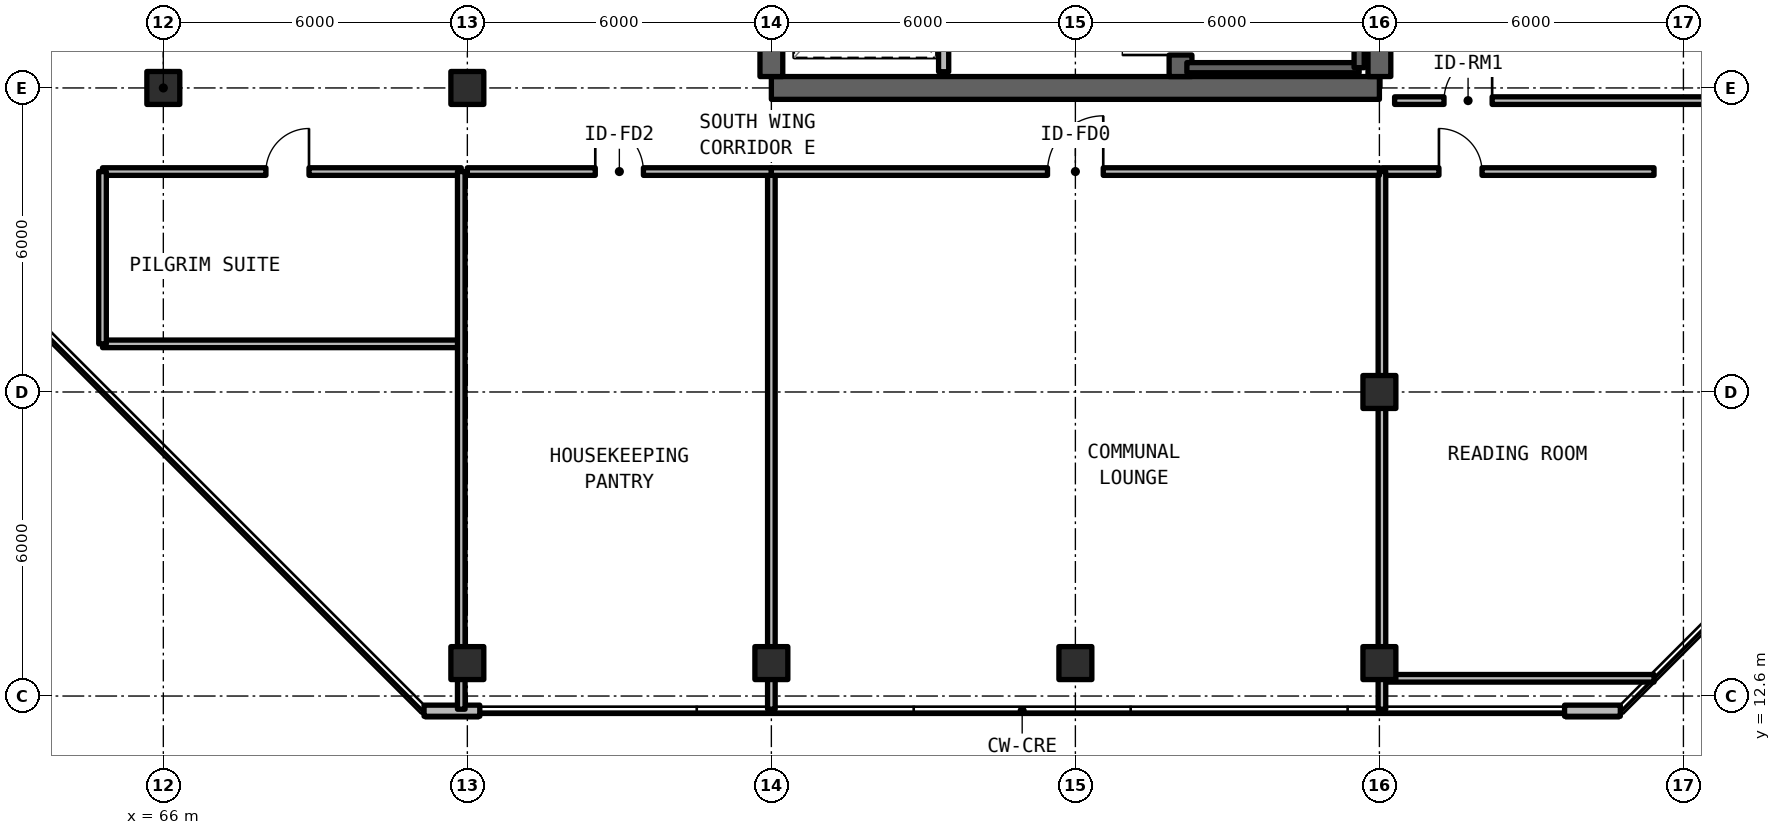
"""IFC4 building model, lengths in metres.
Left out: names, types, materials, properties, quantities, classifications, styles, units other than length and angle.
Written with IfcOpenShell. Run it as: python <this file> out.ifc"""

import sys

from ifc_helpers import new_model, si_unit, direction, frame, frame_2d, origin, origin_2d, place, context, subcontext, project, spatial, rectangle, extrude, element, fill, save


model = new_model("IFC4")
c1 = context("Model", 3, precision=1e-05, world=origin(), true_north=direction((0.0, 1.0)))
c2 = subcontext(c1, "Body", "Model", "MODEL_VIEW")
j1 = project(units=[si_unit("LENGTHUNIT", "METRE"), si_unit("PLANEANGLEUNIT", "RADIAN")], contexts=[c1])
p1 = place(None, origin())
s1 = spatial("IfcSite", under=j1, at=p1, CompositionType="ELEMENT")
p2 = place(p1, origin())
s2 = spatial("IfcBuilding", under=s1, at=p2, CompositionType="ELEMENT")
p3 = place(p2, frame((0.0, 0.0, 253.44)))
s3 = spatial("IfcBuildingStorey", under=s2, at=p3, CompositionType="ELEMENT", Elevation=253.44)
p4 = place(p3, frame((78.0, 24.6, 0.0), z_axis=(0.0, 0.0, 1.0), x_axis=(1.0, 0.0, 0.0)))
e1 = element("IfcWall", 1, at=p4, inside=s3, PredefinedType="SHEAR", context=c2, shape_type="SweptSolid", body=[
    extrude(rectangle(XDim=12.0, YDim=0.45, at=frame_2d((6.0, 0.0))), origin(), (0.0, 0.0, 1.0), 3.63),
])
p5 = place(p3, frame((90.0, 24.825, 0.0), z_axis=(0.0, 0.0, 1.0), x_axis=(0.0, 1.0, 0.0)))
e2 = element("IfcWall", 2, at=p5, inside=s3, PredefinedType="SHEAR", context=c2, shape_type="SweptSolid", body=[
    extrude(rectangle(XDim=17.55, YDim=0.45, at=frame_2d((8.775, 0.0))), origin(), (0.0, 0.0, 1.0), 3.63),
])
p6 = place(p3, frame((78.0, 24.825, 0.0), z_axis=(0.0, 0.0, 1.0), x_axis=(0.0, 1.0, 0.0)))
e3 = element("IfcWall", 3, at=p6, inside=s3, PredefinedType="SHEAR", context=c2, shape_type="SweptSolid", body=[
    extrude(rectangle(XDim=8.975, YDim=0.45, at=frame_2d((4.488, 0.0))), origin(), (0.0, 0.0, 1.0), 3.63),
])
p7 = place(p3, frame((86.075, 24.825, 0.0), z_axis=(0.0, 0.0, 1.0), x_axis=(0.0, 1.0, 0.0)))
e4 = element("IfcWall", 4, at=p7, inside=s3, PredefinedType="SHEAR", context=c2, shape_type="SweptSolid", body=[
    extrude(rectangle(XDim=17.55, YDim=0.45, at=frame_2d((8.775, 0.0))), origin(), (0.0, 0.0, 1.0), 3.63),
])
p8 = place(p7, frame((0.425, 0.0, 0.0)))
e5 = element("IfcOpeningElement", 5, at=p8, cuts=e4, PredefinedType="OPENING", context=c2, shape_type="SweptSolid", body=[
    extrude(rectangle(XDim=1.15, YDim=2.15, at=frame_2d((0.575, 1.075))), frame((0.0, 0.235, 0.0), z_axis=(0.0, -1.0, 0.0), x_axis=(1.0, 0.0, 0.0)), (0.0, 0.0, 1.0), 0.47),
])
p9 = place(p7, frame((9.625, 0.0, 0.0)))
e6 = element("IfcOpeningElement", 6, at=p9, cuts=e4, PredefinedType="OPENING", context=c2, shape_type="SweptSolid", body=[
    extrude(rectangle(XDim=1.15, YDim=2.15, at=frame_2d((0.575, 1.075))), frame((0.0, 0.235, 0.0), z_axis=(0.0, -1.0, 0.0), x_axis=(1.0, 0.0, 0.0)), (0.0, 0.0, 1.0), 0.47),
])
for number, where, z_axis, x_axis in (
    (7, (66.0, 24.6, 0.0), (0.0, 0.0, 1.0), (1.0, 0.0, 0.0)),
    (8, (72.0, 24.6, 0.0), (0.0, 0.0, 1.0), (1.0, 0.0, 0.0)),
    (9, (90.0, 18.6, 0.0), (0.0, 0.0, 1.0), (1.0, 0.0, 0.0)),
    (10, (72.0, 13.25, 0.0), (0.0, 0.0, 1.0), (1.0, 0.0, 0.0)),
    (11, (78.0, 13.25, 0.0), (0.0, 0.0, 1.0), (1.0, 0.0, 0.0)),
    (12, (84.0, 13.25, 0.0), (0.0, 0.0, 1.0), (1.0, 0.0, 0.0)),
    (13, (90.0, 13.25, 0.0), (0.0, 0.0, 1.0), (1.0, 0.0, 0.0)),
):
    element("IfcColumn", number, at=place(p3, frame(where, z_axis=z_axis, x_axis=x_axis)), inside=s3, PredefinedType="COLUMN", context=c2, shape_type="SweptSolid", body=[
        extrude(rectangle(XDim=0.65, YDim=0.65, at=origin_2d()), origin(), (0.0, 0.0, 1.0), 3.63),
    ])
for number, where, z_axis, x_axis in (
    (14, (71.146, 12.31, 0.0), (0.0, 0.0, 1.0), (1.0, 0.0, 0.0)),
    (15, (93.654, 12.31, 0.0), (0.0, 0.0, 1.0), (1.0, 0.0, 0.0)),
):
    element("IfcWall", number, at=place(p3, frame(where, z_axis=z_axis, x_axis=x_axis)), inside=s3, PredefinedType="SOLIDWALL", context=c2, shape_type="SweptSolid", body=[
        extrude(rectangle(XDim=1.1, YDim=0.22, at=frame_2d((0.55, 0.0))), origin(), (0.0, 0.0, 1.0), 3.41),
    ])
p10 = place(p3, frame((81.4, 24.92, 0.0), z_axis=(0.0, 0.0, 1.0), x_axis=(0.0, 1.0, 0.0)))
e16 = element("IfcWall", 16, at=p10, inside=s3, PredefinedType="SOLIDWALL", context=c2, shape_type="SweptSolid", body=[
    extrude(rectangle(XDim=3.58, YDim=0.2, at=frame_2d((1.79, 0.0))), origin(), (0.0, 0.0, 1.0), 2.63),
])
p11 = place(p10, frame((1.3, 0.0, 0.0)))
e17 = element("IfcOpeningElement", 17, at=p11, cuts=e16, PredefinedType="OPENING", context=c2, shape_type="SweptSolid", body=[
    extrude(rectangle(XDim=1.1, YDim=2.2, at=frame_2d((0.55, 1.1))), frame((0.0, 0.11, 0.0), z_axis=(0.0, -1.0, 0.0), x_axis=(1.0, 0.0, 0.0)), (0.0, 0.0, 1.0), 0.22),
])
p12 = place(p3, frame((64.8, 19.55, 0.0), z_axis=(0.0, 0.0, 1.0), x_axis=(1.0, 0.0, 0.0)))
e18 = element("IfcWall", 18, at=p12, inside=s3, PredefinedType="SOLIDWALL", context=c2, shape_type="SweptSolid", body=[
    extrude(rectangle(XDim=7.08, YDim=0.15, at=frame_2d((3.54, 0.0))), origin(), (0.0, 0.0, 1.0), 2.63),
])
p13 = place(p3, frame((64.8, 22.95, 0.0), z_axis=(0.0, 0.0, 1.0), x_axis=(1.0, 0.0, 0.0)))
e19 = element("IfcWall", 19, at=p13, inside=s3, PredefinedType="SOLIDWALL", context=c2, shape_type="SweptSolid", body=[
    extrude(rectangle(XDim=7.08, YDim=0.15, at=frame_2d((3.54, 0.0))), origin(), (0.0, 0.0, 1.0), 2.63),
])
p14 = place(p13, frame((3.225, 0.0, 0.0)))
e20 = element("IfcOpeningElement", 20, at=p14, cuts=e19, PredefinedType="OPENING", context=c2, shape_type="SweptSolid", body=[
    extrude(rectangle(XDim=0.85, YDim=2.1, at=frame_2d((0.425, 1.05))), frame((0.0, 0.085, 0.0), z_axis=(0.0, -1.0, 0.0), x_axis=(1.0, 0.0, 0.0)), (0.0, 0.0, 1.0), 0.17),
])
p15 = place(p3, frame((64.8, 19.55, 0.0), z_axis=(0.0, 0.0, 1.0), x_axis=(0.0, 1.0, 0.0)))
e21 = element("IfcWall", 21, at=p15, inside=s3, PredefinedType="SOLIDWALL", context=c2, shape_type="SweptSolid", body=[
    extrude(rectangle(XDim=3.4, YDim=0.15, at=frame_2d((1.7, 0.0))), origin(), (0.0, 0.0, 1.0), 2.63),
])
p16 = place(p3, frame((71.88, 12.34, 0.0), z_axis=(0.0, 0.0, 1.0), x_axis=(0.0, 1.0, 0.0)))
e22 = element("IfcWall", 22, at=p16, inside=s3, PredefinedType="SOLIDWALL", context=c2, shape_type="SweptSolid", body=[
    extrude(rectangle(XDim=10.61, YDim=0.15, at=frame_2d((5.305, 0.0))), origin(), (0.0, 0.0, 1.0), 2.63),
])
p17 = place(p3, frame((90.3, 24.35, 0.0), z_axis=(0.0, 0.0, 1.0), x_axis=(1.0, 0.0, 0.0)))
e23 = element("IfcWall", 23, at=p17, inside=s3, PredefinedType="SOLIDWALL", context=c2, shape_type="SweptSolid", body=[
    extrude(rectangle(XDim=8.52, YDim=0.15, at=frame_2d((4.26, 0.0))), origin(), (0.0, 0.0, 1.0), 2.63),
])
p18 = place(p17, frame((0.975, 0.0, 0.0)))
e24 = element("IfcOpeningElement", 24, at=p18, cuts=e23, PredefinedType="OPENING", context=c2, shape_type="SweptSolid", body=[
    extrude(rectangle(XDim=0.95, YDim=2.15, at=frame_2d((0.475, 1.075))), frame((0.0, 0.085, 0.0), z_axis=(0.0, -1.0, 0.0), x_axis=(1.0, 0.0, 0.0)), (0.0, 0.0, 1.0), 0.17),
])
p19 = place(p3, frame((90.05, 12.95, 0.0), z_axis=(0.0, 0.0, 1.0), x_axis=(1.0, 0.0, 0.0)))
e25 = element("IfcWall", 25, at=p19, inside=s3, PredefinedType="SOLIDWALL", context=c2, shape_type="SweptSolid", body=[
    extrude(rectangle(XDim=5.37, YDim=0.15, at=frame_2d((2.685, 0.0))), origin(), (0.0, 0.0, 1.0), 2.63),
])
p20 = place(p3, frame((90.05, 22.95, 0.0), z_axis=(0.0, 0.0, 1.0), x_axis=(1.0, 0.0, 0.0)))
e26 = element("IfcWall", 26, at=p20, inside=s3, PredefinedType="SOLIDWALL", context=c2, shape_type="SweptSolid", body=[
    extrude(rectangle(XDim=5.37, YDim=0.15, at=frame_2d((2.685, 0.0))), origin(), (0.0, 0.0, 1.0), 2.63),
])
p21 = place(p20, frame((1.125, 0.0, 0.0)))
e27 = element("IfcOpeningElement", 27, at=p21, cuts=e26, PredefinedType="OPENING", context=c2, shape_type="SweptSolid", body=[
    extrude(rectangle(XDim=0.85, YDim=2.1, at=frame_2d((0.425, 1.05))), frame((0.0, 0.085, 0.0), z_axis=(0.0, -1.0, 0.0), x_axis=(1.0, 0.0, 0.0)), (0.0, 0.0, 1.0), 0.17),
])
for number, where, z_axis, x_axis in (
    (28, (90.05, 12.34, 0.0), (0.0, 0.0, 1.0), (0.0, 1.0, 0.0)),
    (29, (78.0, 12.34, 0.0), (0.0, 0.0, 1.0), (0.0, 1.0, 0.0)),
):
    element("IfcWall", number, at=place(p3, frame(where, z_axis=z_axis, x_axis=x_axis)), inside=s3, PredefinedType="SOLIDWALL", context=c2, shape_type="SweptSolid", body=[
        extrude(rectangle(XDim=10.61, YDim=0.15, at=frame_2d((5.305, 0.0))), origin(), (0.0, 0.0, 1.0), 2.63),
    ])
p22 = place(p3, frame((72.0, 22.95, 0.0), z_axis=(0.0, 0.0, 1.0), x_axis=(1.0, 0.0, 0.0)))
e30 = element("IfcWall", 30, at=p22, inside=s3, PredefinedType="SOLIDWALL", context=c2, shape_type="SweptSolid", body=[
    extrude(rectangle(XDim=6.0, YDim=0.15, at=frame_2d((3.0, 0.0))), origin(), (0.0, 0.0, 1.0), 2.63),
])
p23 = place(p22, frame((2.525, 0.0, 0.0)))
e31 = element("IfcOpeningElement", 31, at=p23, cuts=e30, PredefinedType="OPENING", context=c2, shape_type="SweptSolid", body=[
    extrude(rectangle(XDim=0.95, YDim=2.15, at=frame_2d((0.475, 1.075))), frame((0.0, 0.085, 0.0), z_axis=(0.0, -1.0, 0.0), x_axis=(1.0, 0.0, 0.0)), (0.0, 0.0, 1.0), 0.17),
])
p24 = place(p3, frame((78.0, 22.95, 0.0), z_axis=(0.0, 0.0, 1.0), x_axis=(1.0, 0.0, 0.0)))
e32 = element("IfcWall", 32, at=p24, inside=s3, PredefinedType="SOLIDWALL", context=c2, shape_type="SweptSolid", body=[
    extrude(rectangle(XDim=12.0, YDim=0.15, at=frame_2d((6.0, 0.0))), origin(), (0.0, 0.0, 1.0), 2.63),
])
p25 = place(p24, frame((5.45, 0.0, 0.0)))
e33 = element("IfcOpeningElement", 33, at=p25, cuts=e32, PredefinedType="OPENING", context=c2, shape_type="SweptSolid", body=[
    extrude(rectangle(XDim=1.1, YDim=2.15, at=frame_2d((0.55, 1.075))), frame((0.0, 0.085, 0.0), z_axis=(0.0, -1.0, 0.0), x_axis=(1.0, 0.0, 0.0)), (0.0, 0.0, 1.0), 0.17),
])
p26 = place(p3, frame((86.2, 25.0, 0.0), z_axis=(0.0, 0.0, 1.0), x_axis=(1.0, 0.0, 0.0)))
e34 = element("IfcWall", 34, at=p26, inside=s3, PredefinedType="SOLIDWALL", context=c2, shape_type="SweptSolid", body=[
    extrude(rectangle(XDim=3.4, YDim=0.2, at=frame_2d((1.7, 0.0))), origin(), (0.0, 0.0, 1.0), 3.63),
])
p27 = place(p3, frame((89.6, 25.0, 0.0), z_axis=(0.0, 0.0, 1.0), x_axis=(0.0, 1.0, 0.0)))
e35 = element("IfcWall", 35, at=p27, inside=s3, PredefinedType="SOLIDWALL", context=c2, shape_type="SweptSolid", body=[
    extrude(rectangle(XDim=8.0, YDim=0.2, at=frame_2d((4.0, 0.0))), origin(), (0.0, 0.0, 1.0), 3.63),
])
p28 = place(p14, origin())
e36 = element("IfcDoor", 36, at=p28, inside=s3, OperationType="SINGLE_SWING_RIGHT", PredefinedType="DOOR", context=c2, shape_type="SweptSolid", body=[
    extrude(rectangle(XDim=0.85, YDim=2.1, at=frame_2d((0.425, 1.05))), frame((0.0, 0.025, 0.0), z_axis=(0.0, -1.0, 0.0), x_axis=(1.0, 0.0, 0.0)), (0.0, 0.0, 1.0), 0.05),
])
fill(e20, e36)
p29 = place(p18, origin())
e37 = element("IfcDoor", 37, at=p29, inside=s3, OperationType="SINGLE_SWING_RIGHT", PredefinedType="DOOR", context=c2, shape_type="SweptSolid", body=[
    extrude(rectangle(XDim=0.95, YDim=2.15, at=frame_2d((0.475, 1.075))), frame((0.0, 0.025, 0.0), z_axis=(0.0, -1.0, 0.0), x_axis=(1.0, 0.0, 0.0)), (0.0, 0.0, 1.0), 0.05),
])
fill(e24, e37)
p30 = place(p21, origin())
e38 = element("IfcDoor", 38, at=p30, inside=s3, OperationType="SINGLE_SWING_LEFT", PredefinedType="DOOR", context=c2, shape_type="SweptSolid", body=[
    extrude(rectangle(XDim=0.85, YDim=2.1, at=frame_2d((0.425, 1.05))), frame((0.0, 0.025, 0.0), z_axis=(0.0, -1.0, 0.0), x_axis=(1.0, 0.0, 0.0)), (0.0, 0.0, 1.0), 0.05),
])
fill(e27, e38)
p31 = place(p23, origin())
e39 = element("IfcDoor", 39, at=p31, inside=s3, OperationType="SINGLE_SWING_LEFT", PredefinedType="DOOR", context=c2, shape_type="SweptSolid", body=[
    extrude(rectangle(XDim=0.95, YDim=2.15, at=frame_2d((0.475, 1.075))), frame((0.0, 0.025, 0.0), z_axis=(0.0, -1.0, 0.0), x_axis=(1.0, 0.0, 0.0)), (0.0, 0.0, 1.0), 0.05),
])
fill(e31, e39)
p32 = place(p25, origin())
e40 = element("IfcDoor", 40, at=p32, inside=s3, OperationType="SINGLE_SWING_RIGHT", PredefinedType="DOOR", context=c2, shape_type="SweptSolid", body=[
    extrude(rectangle(XDim=1.1, YDim=2.15, at=frame_2d((0.55, 1.075))), frame((0.0, 0.025, 0.0), z_axis=(0.0, -1.0, 0.0), x_axis=(1.0, 0.0, 0.0)), (0.0, 0.0, 1.0), 0.05),
])
fill(e33, e40)
p33 = place(p8, origin())
e41 = element("IfcDoor", 41, at=p33, inside=s3, OperationType="SINGLE_SWING_RIGHT", PredefinedType="DOOR", context=c2, shape_type="SweptSolid", body=[
    extrude(rectangle(XDim=1.15, YDim=2.15, at=frame_2d((0.575, 1.075))), frame((0.0, 0.025, 0.0), z_axis=(0.0, -1.0, 0.0), x_axis=(1.0, 0.0, 0.0)), (0.0, 0.0, 1.0), 0.05),
])
fill(e5, e41)
save(model, sys.argv[1])
